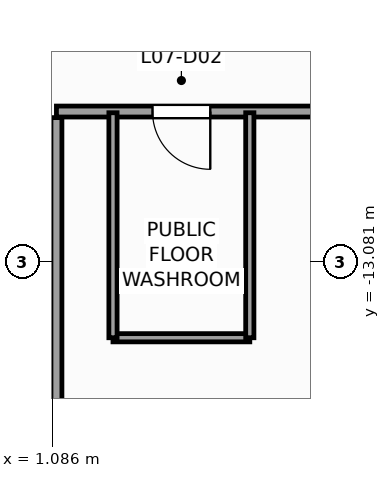
"""IFC4 building model, lengths in metres.
Left out: names, types, materials, properties, quantities, classifications, styles, units other than length and angle.
Written with IfcOpenShell. Run it as: python <this file> out.ifc"""

import sys

from ifc_helpers import new_model, si_unit, direction, frame, frame_2d, origin, place, context, subcontext, project, spatial, rectangle, extrude, source, transform, mapped, element, fill, save


model = new_model("IFC4")
c1 = context("Model", 3, precision=1e-05, world=origin(), true_north=direction((0.0, 1.0)))
c2 = subcontext(c1, "Body", "Model", "MODEL_VIEW")
j1 = project(units=[si_unit("LENGTHUNIT", "METRE"), si_unit("PLANEANGLEUNIT", "RADIAN")], contexts=[c1])
p1 = place(None, origin())
s1 = spatial("IfcSite", under=j1, at=p1, CompositionType="ELEMENT")
p2 = place(p1, origin())
s2 = spatial("IfcBuilding", under=s1, at=p2, CompositionType="ELEMENT")
p3 = place(p2, frame((0.0, 0.0, 34.0)))
s3 = spatial("IfcBuildingStorey", under=s2, at=p3, CompositionType="ELEMENT", Elevation=34.0)
p4 = place(p3, frame((1.15, -10.6, 0.0), z_axis=(0.0, 0.0, 1.0), x_axis=(1.0, 0.0, 0.0)))
e1 = element("IfcWall", 1, at=p4, inside=s3, PredefinedType="PARTITIONING", context=c2, shape_type="SweptSolid", body=[
    extrude(rectangle(XDim=9.45, YDim=0.18, at=frame_2d((4.725, 0.0))), origin(), (0.0, 0.0, 1.0), 3.72),
])
p5 = place(p4, frame((1.58, 0.0, 0.0)))
e2 = element("IfcOpeningElement", 2, at=p5, cuts=e1, PredefinedType="OPENING", context=c2, shape_type="SweptSolid", body=[
    extrude(rectangle(XDim=0.95, YDim=2.1, at=frame_2d((0.475, 1.05))), frame((0.0, 0.1, 0.0), z_axis=(0.0, -1.0, 0.0), x_axis=(1.0, 0.0, 0.0)), (0.0, 0.0, 1.0), 0.2),
])
p6 = place(p3, frame((1.15, -28.685, 0.0), z_axis=(0.0, 0.0, 1.0), x_axis=(0.0, 1.0, 0.0)))
e3 = element("IfcWall", 3, at=p6, inside=s3, PredefinedType="PARTITIONING", context=c2, shape_type="SweptSolid", body=[
    extrude(rectangle(XDim=17.985, YDim=0.18, at=frame_2d((8.993, 0.0))), origin(), (0.0, 0.0, 1.0), 3.72),
])
p7 = place(p3, frame((2.08, -14.32, 0.0), z_axis=(0.0, 0.0, 1.0), x_axis=(1.0, 0.0, 0.0)))
e4 = element("IfcWall", 4, at=p7, inside=s3, PredefinedType="PARTITIONING", context=c2, shape_type="SweptSolid", body=[
    extrude(rectangle(XDim=2.25, YDim=0.135, at=frame_2d((1.125, 0.0))), origin(), (0.0, 0.0, 1.0), 3.72),
])
for number, where, z_axis, x_axis in (
    (5, (4.33, -14.32, 0.0), (0.0, 0.0, 1.0), (0.0, 1.0, 0.0)),
    (6, (2.08, -14.32, 0.0), (0.0, 0.0, 1.0), (0.0, 1.0, 0.0)),
):
    element("IfcWall", number, at=place(p3, frame(where, z_axis=z_axis, x_axis=x_axis)), inside=s3, PredefinedType="PARTITIONING", context=c2, shape_type="SweptSolid", body=[
        extrude(rectangle(XDim=3.7, YDim=0.135, at=frame_2d((1.85, 0.0))), origin(), (0.0, 0.0, 1.0), 3.72),
    ])
m1 = source(origin(), c2, "Body", "SweptSolid", [
    extrude(rectangle(XDim=0.95, YDim=2.1, at=frame_2d((0.475, 1.05))), frame((0.0, 0.025, 0.0), z_axis=(0.0, -1.0, 0.0), x_axis=(1.0, 0.0, 0.0)), (0.0, 0.0, 1.0), 0.05),
])
p8 = place(p5, frame((0.95, 0.0, 0.0), z_axis=(0.0, 0.0, 1.0), x_axis=(-1.0, 0.0, 0.0)))
e7 = element("IfcDoor", 7, at=p8, inside=s3, OperationType="SINGLE_SWING_RIGHT", PredefinedType="DOOR", context=c2, shape_type="MappedRepresentation", body=[
    mapped(m1, transform((0.0, 0.0, 0.0), scale=1.0)),
])
fill(e2, e7)
save(model, sys.argv[1])
